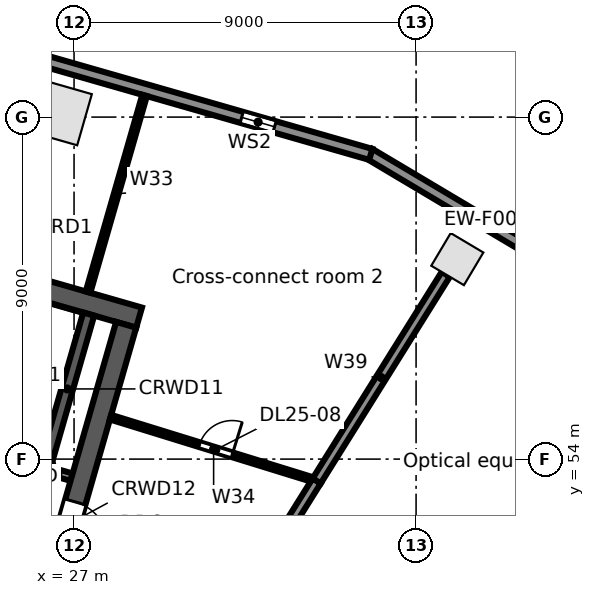
"""IFC4 building model, lengths in metres.
Left out: names, types, materials, properties, quantities, classifications, styles, units other than length and angle.
Written with IfcOpenShell. Run it as: python <this file> out.ifc"""

import sys

from ifc_helpers import new_model, si_unit, direction, frame, frame_2d, origin, origin_2d, place, context, subcontext, project, spatial, rectangle, extrude, element, fill, save


model = new_model("IFC4")
c1 = context("Model", 3, precision=1e-05, world=origin(), true_north=direction((0.0, 1.0)))
c2 = subcontext(c1, "Body", "Model", "MODEL_VIEW")
j1 = project(units=[si_unit("LENGTHUNIT", "METRE"), si_unit("PLANEANGLEUNIT", "RADIAN")], contexts=[c1])
p1 = place(None, origin())
s1 = spatial("IfcSite", under=j1, at=p1, CompositionType="ELEMENT")
p2 = place(p1, origin())
s2 = spatial("IfcBuilding", under=s1, at=p2, CompositionType="ELEMENT")
p3 = place(p2, frame((0.0, 0.0, 123.5)))
s3 = spatial("IfcBuildingStorey", under=s2, at=p3, CompositionType="ELEMENT", Elevation=123.5)
p4 = place(p3, frame((37.085, 59.262, 0.0), z_axis=(0.0, 0.0, 1.0), x_axis=(-0.859406411501, 0.511293086077, 0.0)))
e1 = element("IfcColumn", 1, at=p4, inside=s3, PredefinedType="COLUMN", context=c2, shape_type="SweptSolid", body=[
    extrude(rectangle(XDim=1.0, YDim=1.0, at=origin_2d()), origin(), (0.0, 0.0, 1.0), 4.4),
])
p5 = place(p3, frame((26.603, 63.124, 0.0), z_axis=(0.0, 0.0, 1.0), x_axis=(-0.961261695938, 0.275637355817, 0.0)))
e2 = element("IfcColumn", 2, at=p5, inside=s3, PredefinedType="COLUMN", context=c2, shape_type="SweptSolid", body=[
    extrude(rectangle(XDim=1.4, YDim=1.4, at=origin_2d()), origin(), (0.0, 0.0, 1.0), 4.4),
])
p6 = place(p3, frame((34.773, 62.034, 0.0), z_axis=(0.0, 0.0, 1.0), x_axis=(0.859401317772, -0.511301647769, 0.0)))
e3 = element("IfcWall", 3, at=p6, inside=s3, PredefinedType="STANDARD", context=c2, shape_type="SweptSolid", body=[
    extrude(rectangle(XDim=6.808, YDim=0.3, at=frame_2d((3.404, 0.0))), origin(), (0.0, 0.0, 1.0), 4.08),
])
p7 = place(p3, frame((3.335, 71.044, 0.0), z_axis=(0.0, 0.0, 1.0), x_axis=(0.961260130989, -0.275642813387, 0.0)))
e4 = element("IfcWall", 4, at=p7, inside=s3, PredefinedType="STANDARD", context=c2, shape_type="SweptSolid", body=[
    extrude(rectangle(XDim=32.741, YDim=0.3, at=frame_2d((16.371, 0.0))), origin(), (0.0, 0.0, 1.0), 4.08),
])
p8 = place(p7, frame((29.207, 0.0, 0.6)))
e5 = element("IfcOpeningElement", 5, at=p8, cuts=e4, PredefinedType="OPENING", context=c2, shape_type="SweptSolid", body=[
    extrude(rectangle(XDim=0.9, YDim=2.8, at=frame_2d((0.45, 1.4))), frame((0.0, 0.16, 0.0), z_axis=(0.0, -1.0, 0.0), x_axis=(1.0, 0.0, 0.0)), (0.0, 0.0, 1.0), 0.32),
])
p9 = place(p7, frame((21.034, 0.0, 0.6)))
e6 = element("IfcOpeningElement", 6, at=p9, cuts=e4, PredefinedType="OPENING", context=c2, shape_type="SweptSolid", body=[
    extrude(rectangle(XDim=0.9, YDim=2.8, at=frame_2d((0.45, 1.4))), frame((0.0, 0.16, 0.0), z_axis=(0.0, -1.0, 0.0), x_axis=(1.0, 0.0, 0.0)), (0.0, 0.0, 1.0), 0.32),
])
p10 = place(p7, frame((12.861, 0.0, 0.6)))
e7 = element("IfcOpeningElement", 7, at=p10, cuts=e4, PredefinedType="OPENING", context=c2, shape_type="SweptSolid", body=[
    extrude(rectangle(XDim=0.9, YDim=2.8, at=frame_2d((0.45, 1.4))), frame((0.0, 0.16, 0.0), z_axis=(0.0, -1.0, 0.0), x_axis=(1.0, 0.0, 0.0)), (0.0, 0.0, 1.0), 0.32),
])
p11 = place(p7, frame((4.688, 0.0, 0.6)))
e8 = element("IfcOpeningElement", 8, at=p11, cuts=e4, PredefinedType="OPENING", context=c2, shape_type="SweptSolid", body=[
    extrude(rectangle(XDim=0.9, YDim=2.8, at=frame_2d((0.45, 1.4))), frame((0.0, 0.16, 0.0), z_axis=(0.0, -1.0, 0.0), x_axis=(1.0, 0.0, 0.0)), (0.0, 0.0, 1.0), 0.32),
])
p12 = place(p3, frame((26.214, 53.732, 0.0), z_axis=(0.0, 0.0, 1.0), x_axis=(0.961240918172, -0.275709806194, 0.0)))
e9 = element("IfcWall", 9, at=p12, inside=s3, PredefinedType="SOLIDWALL", context=c2, shape_type="SweptSolid", body=[
    extrude(rectangle(XDim=0.75, YDim=0.2, at=frame_2d((0.375, 0.0))), origin(), (0.0, 0.0, 1.0), 4.08),
])
p13 = place(p3, frame((20.06, 60.204, 0.0), z_axis=(0.0, 0.0, 1.0), x_axis=(0.96126248289, -0.275634611374, 0.0)))
e10 = element("IfcWall", 10, at=p13, inside=s3, PredefinedType="SOLIDWALL", context=c2, shape_type="SweptSolid", body=[
    extrude(rectangle(XDim=9.0, YDim=0.55, at=frame_2d((4.5, 0.0))), origin(), (0.0, 0.0, 1.0), 4.08),
])
p14 = place(p3, frame((26.256, 53.876, 0.0), z_axis=(0.0, 0.0, 1.0), x_axis=(0.275641165445, 0.961260603537, 0.0)))
e11 = element("IfcWall", 11, at=p14, inside=s3, PredefinedType="SOLIDWALL", context=c2, shape_type="SweptSolid", body=[
    extrude(rectangle(XDim=4.1, YDim=0.3, at=frame_2d((2.05, 0.0))), origin(), (0.0, 0.0, 1.0), 4.08),
])
p15 = place(p3, frame((25.366, 47.057, 0.0), z_axis=(0.0, 0.0, 1.0), x_axis=(0.275632146085, 0.96126318979, 0.0)))
e12 = element("IfcWall", 12, at=p15, inside=s3, PredefinedType="SOLIDWALL", context=c2, shape_type="SweptSolid", body=[
    extrude(rectangle(XDim=10.9, YDim=0.55, at=frame_2d((5.45, 0.0))), origin(), (0.0, 0.0, 1.0), 4.08),
])
p16 = place(p15, frame((4.85, 0.0, 0.0)))
e13 = element("IfcOpeningElement", 13, at=p16, cuts=e12, PredefinedType="OPENING", context=c2, shape_type="SweptSolid", body=[
    extrude(rectangle(XDim=1.2, YDim=2.1, at=frame_2d((0.6, 1.05))), frame((0.0, 0.285, 0.0), z_axis=(0.0, -1.0, 0.0), x_axis=(1.0, 0.0, 0.0)), (0.0, 0.0, 1.0), 0.57),
])
p17 = place(p3, frame((27.368, 58.394, 0.0), z_axis=(0.0, 0.0, 1.0), x_axis=(0.276295387056, 0.961072764722, 0.0)))
e14 = element("IfcWall", 14, at=p17, inside=s3, PredefinedType="PARTITIONING", context=c2, shape_type="SweptSolid", body=[
    extrude(rectangle(XDim=5.386, YDim=0.125, at=frame_2d((2.693, 0.0))), origin(), (0.0, 0.0, 1.0), 3.142),
])
p18 = place(p3, frame((27.96, 55.103, 0.0), z_axis=(0.0, 0.0, 1.0), x_axis=(0.955442775069, -0.29517639399, 0.0)))
e15 = element("IfcWall", 15, at=p18, inside=s3, PredefinedType="PARTITIONING", context=c2, shape_type="SweptSolid", body=[
    extrude(rectangle(XDim=5.678, YDim=0.125, at=frame_2d((2.839, 0.0))), origin(), (0.0, 0.0, 1.0), 3.142),
])
p19 = place(p18, frame((2.45, 0.0, 0.0)))
e16 = element("IfcOpeningElement", 16, at=p19, cuts=e15, PredefinedType="OPENING", context=c2, shape_type="SweptSolid", body=[
    extrude(rectangle(XDim=0.9, YDim=2.1, at=frame_2d((0.45, 1.05))), frame((0.0, 0.073, 0.0), z_axis=(0.0, -1.0, 0.0), x_axis=(1.0, 0.0, 0.0)), (0.0, 0.0, 1.0), 0.145),
])
p20 = place(p3, frame((29.675, 47.491, 0.0), z_axis=(0.0, 0.0, 1.0), x_axis=(0.529992669945, 0.848002222759, 0.0)))
e17 = element("IfcWall", 17, at=p20, inside=s3, PredefinedType="PARTITIONING", context=c2, shape_type="SweptSolid", body=[
    extrude(rectangle(XDim=7.0, YDim=0.25, at=frame_2d((3.5, 0.0))), origin(), (0.0, 0.0, 1.0), 3.142),
])
p21 = place(p3, frame((33.385, 53.427, 0.0), z_axis=(0.0, 0.0, 1.0), x_axis=(0.52989620904, 0.848062502204, 0.0)))
e18 = element("IfcWall", 18, at=p21, inside=s3, PredefinedType="PARTITIONING", context=c2, shape_type="SweptSolid", body=[
    extrude(rectangle(XDim=6.409, YDim=0.25, at=frame_2d((3.204, 0.0))), origin(), (0.0, 0.0, 1.0), 3.142),
])
p22 = place(p8, origin())
e19 = element("IfcWindow", 19, at=p22, inside=s3, PartitioningType="SINGLE_PANEL", PredefinedType="WINDOW", context=c2, shape_type="SweptSolid", body=[
    extrude(rectangle(XDim=0.9, YDim=2.8, at=frame_2d((0.45, 1.4))), frame((0.0, 0.03, 0.0), z_axis=(0.0, -1.0, 0.0), x_axis=(1.0, 0.0, 0.0)), (0.0, 0.0, 1.0), 0.06),
])
fill(e5, e19)
p23 = place(p16, frame((1.2, 0.0, 0.0), z_axis=(0.0, 0.0, 1.0), x_axis=(-1.0, 0.0, 0.0)))
e20 = element("IfcDoor", 20, at=p23, inside=s3, OperationType="SINGLE_SWING_RIGHT", PredefinedType="DOOR", context=c2, shape_type="SweptSolid", body=[
    extrude(rectangle(XDim=1.2, YDim=2.1, at=frame_2d((0.6, 1.05))), frame((0.0, 0.025, 0.0), z_axis=(0.0, -1.0, 0.0), x_axis=(1.0, 0.0, 0.0)), (0.0, 0.0, 1.0), 0.05),
])
fill(e13, e20)
p24 = place(p19, origin())
e21 = element("IfcDoor", 21, at=p24, inside=s3, OperationType="SINGLE_SWING_RIGHT", PredefinedType="DOOR", context=c2, shape_type="SweptSolid", body=[
    extrude(rectangle(XDim=0.9, YDim=2.1, at=frame_2d((0.45, 1.05))), frame((0.0, 0.025, 0.0), z_axis=(0.0, -1.0, 0.0), x_axis=(1.0, 0.0, 0.0)), (0.0, 0.0, 1.0), 0.05),
])
fill(e16, e21)
save(model, sys.argv[1])
